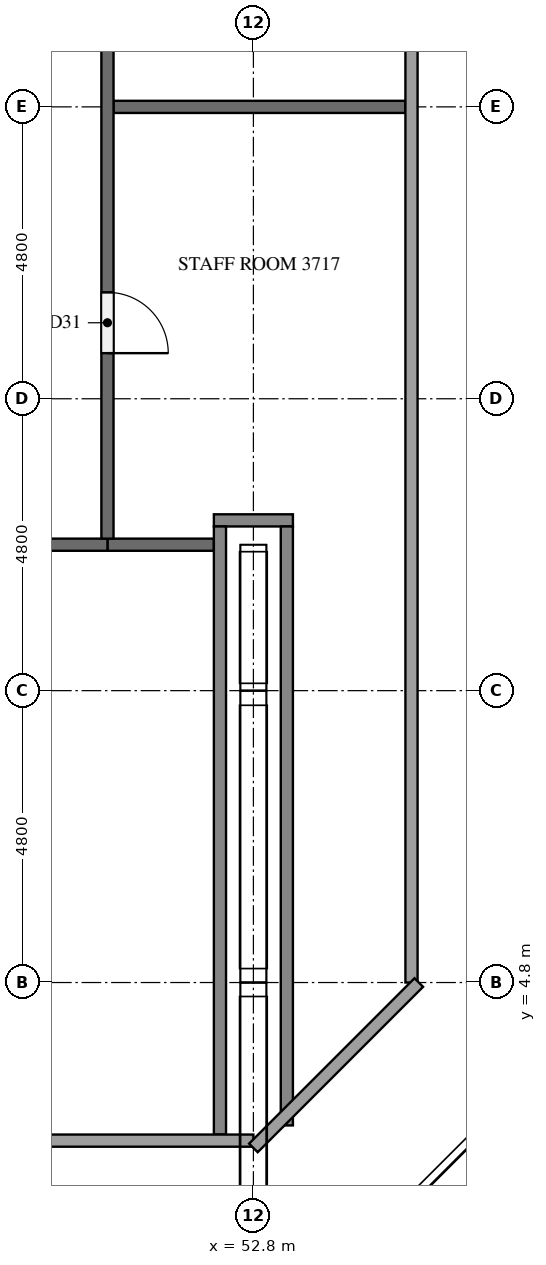
"""IFC4 building model, lengths in metres.
Left out: names, types, materials, properties, quantities, classifications, styles, units other than length and angle.
Written with IfcOpenShell. Run it as: python <this file> out.ifc"""

import sys

from ifc_helpers import new_model, si_unit, direction, frame, frame_2d, origin, place, context, subcontext, project, spatial, rectangle, extrude, element, fill, save


model = new_model("IFC4")
c1 = context("Model", 3, precision=1e-05, world=origin(), true_north=direction((0.0, 1.0)))
c2 = subcontext(c1, "Body", "Model", "MODEL_VIEW")
j1 = project(units=[si_unit("LENGTHUNIT", "METRE"), si_unit("PLANEANGLEUNIT", "RADIAN")], contexts=[c1])
p1 = place(None, origin())
s1 = spatial("IfcSite", under=j1, at=p1, CompositionType="ELEMENT")
p2 = place(p1, origin())
s2 = spatial("IfcBuilding", under=s1, at=p2, CompositionType="ELEMENT")
p3 = place(p2, frame((0.0, 0.0, 143.6)))
s3 = spatial("IfcBuildingStorey", under=s2, at=p3, CompositionType="ELEMENT", Elevation=143.6)
p4 = place(p3, frame((50.4, 12.0, 0.0), z_axis=(0.0, 0.0, 1.0), x_axis=(1.0, 0.0, 0.0)))
e1 = element("IfcWall", 1, at=p4, inside=s3, PredefinedType="PARTITIONING", context=c2, shape_type="SweptSolid", body=[
    extrude(rectangle(XDim=1.75, YDim=0.2, at=frame_2d((0.875, 0.0))), origin(), (0.0, 0.0, 1.0), 5.1),
])
p5 = place(p3, frame((50.4, 12.0, 0.0), z_axis=(0.0, 0.0, 1.0), x_axis=(-1.0, 0.0, 0.0)))
e2 = element("IfcWall", 2, at=p5, inside=s3, PredefinedType="PARTITIONING", context=c2, shape_type="SweptSolid", body=[
    extrude(rectangle(XDim=6.75, YDim=0.2, at=frame_2d((3.375, 0.0))), origin(), (0.0, 0.0, 1.0), 5.1),
])
p6 = place(p5, frame((2.85, 0.0, 0.0)))
e3 = element("IfcOpeningElement", 3, at=p6, cuts=e2, PredefinedType="OPENING", context=c2, shape_type="SweptSolid", body=[
    extrude(rectangle(XDim=1.0, YDim=2.1, at=frame_2d((0.5, 1.05))), frame((0.0, 0.11, 0.0), z_axis=(0.0, -1.0, 0.0), x_axis=(1.0, 0.0, 0.0)), (0.0, 0.0, 1.0), 0.22),
])
p7 = place(p3, frame((52.15, 12.4, 0.0), z_axis=(0.0, 0.0, 1.0), x_axis=(1.0, 0.0, 0.0)))
e4 = element("IfcWall", 4, at=p7, inside=s3, PredefinedType="PARTITIONING", context=c2, shape_type="SweptSolid", body=[
    extrude(rectangle(XDim=1.3, YDim=0.2, at=frame_2d((0.65, 0.0))), origin(), (0.0, 0.0, 1.0), 5.1),
])
p8 = place(p3, frame((50.5, 19.2, 0.0), z_axis=(0.0, 0.0, 1.0), x_axis=(1.0, 0.0, 0.0)))
e5 = element("IfcWall", 5, at=p8, inside=s3, PredefinedType="PARTITIONING", context=c2, shape_type="SweptSolid", body=[
    extrude(rectangle(XDim=4.8, YDim=0.2, at=frame_2d((2.4, 0.0))), origin(), (0.0, 0.0, 1.0), 5.1),
])
p9 = place(p3, frame((50.4, 40.7, 0.0), z_axis=(0.0, 0.0, 1.0), x_axis=(0.0, -1.0, 0.0)))
e6 = element("IfcWall", 6, at=p9, inside=s3, PredefinedType="PARTITIONING", context=c2, shape_type="SweptSolid", body=[
    extrude(rectangle(XDim=28.6, YDim=0.2, at=frame_2d((14.3, 0.0))), origin(), (0.0, 0.0, 1.0), 5.1),
])
p10 = place(p9, frame((24.55, 0.0, 0.0)))
e7 = element("IfcOpeningElement", 7, at=p10, cuts=e6, PredefinedType="OPENING", context=c2, shape_type="SweptSolid", body=[
    extrude(rectangle(XDim=1.0, YDim=2.1, at=frame_2d((0.5, 1.05))), frame((0.0, 0.11, 0.0), z_axis=(0.0, -1.0, 0.0), x_axis=(1.0, 0.0, 0.0)), (0.0, 0.0, 1.0), 0.22),
])
p11 = place(p9, frame((18.65, 0.0, 0.0)))
e8 = element("IfcOpeningElement", 8, at=p11, cuts=e6, PredefinedType="OPENING", context=c2, shape_type="SweptSolid", body=[
    extrude(rectangle(XDim=1.0, YDim=2.1, at=frame_2d((0.5, 1.05))), frame((0.0, 0.11, 0.0), z_axis=(0.0, -1.0, 0.0), x_axis=(1.0, 0.0, 0.0)), (0.0, 0.0, 1.0), 0.22),
])
p12 = place(p9, frame((13.85, 0.0, 0.0)))
e9 = element("IfcOpeningElement", 9, at=p12, cuts=e6, PredefinedType="OPENING", context=c2, shape_type="SweptSolid", body=[
    extrude(rectangle(XDim=1.0, YDim=2.1, at=frame_2d((0.5, 1.05))), frame((0.0, 0.11, 0.0), z_axis=(0.0, -1.0, 0.0), x_axis=(1.0, 0.0, 0.0)), (0.0, 0.0, 1.0), 0.22),
])
p13 = place(p9, frame((9.05, 0.0, 0.0)))
e10 = element("IfcOpeningElement", 10, at=p13, cuts=e6, PredefinedType="OPENING", context=c2, shape_type="SweptSolid", body=[
    extrude(rectangle(XDim=1.0, YDim=2.1, at=frame_2d((0.5, 1.05))), frame((0.0, 0.11, 0.0), z_axis=(0.0, -1.0, 0.0), x_axis=(1.0, 0.0, 0.0)), (0.0, 0.0, 1.0), 0.22),
])
p14 = place(p9, frame((3.05, 0.0, 0.0)))
e11 = element("IfcOpeningElement", 11, at=p14, cuts=e6, PredefinedType="OPENING", context=c2, shape_type="SweptSolid", body=[
    extrude(rectangle(XDim=1.0, YDim=2.1, at=frame_2d((0.5, 1.05))), frame((0.0, 0.11, 0.0), z_axis=(0.0, -1.0, 0.0), x_axis=(1.0, 0.0, 0.0)), (0.0, 0.0, 1.0), 0.22),
])
p15 = place(p3, frame((52.25, 2.3, 0.0), z_axis=(0.0, 0.0, 1.0), x_axis=(0.0, 1.0, 0.0)))
e12 = element("IfcWall", 12, at=p15, inside=s3, PredefinedType="PARTITIONING", context=c2, shape_type="SweptSolid", body=[
    extrude(rectangle(XDim=10.0, YDim=0.2, at=frame_2d((5.0, 0.0))), origin(), (0.0, 0.0, 1.0), 5.1),
])
p16 = place(p3, frame((53.35, 2.45, 0.0), z_axis=(0.0, 0.0, 1.0), x_axis=(0.0, 1.0, 0.0)))
e13 = element("IfcWall", 13, at=p16, inside=s3, PredefinedType="PARTITIONING", context=c2, shape_type="SweptSolid", body=[
    extrude(rectangle(XDim=9.85, YDim=0.2, at=frame_2d((4.925, 0.0))), origin(), (0.0, 0.0, 1.0), 5.1),
])
p17 = place(p10, origin())
e14 = element("IfcDoor", 14, at=p17, inside=s3, OperationType="SINGLE_SWING_RIGHT", PredefinedType="DOOR", context=c2, shape_type="SweptSolid", body=[
    extrude(rectangle(XDim=1.0, YDim=2.1, at=frame_2d((0.5, 1.05))), frame((0.0, 0.025, 0.0), z_axis=(0.0, -1.0, 0.0), x_axis=(1.0, 0.0, 0.0)), (0.0, 0.0, 1.0), 0.05),
])
fill(e7, e14)
save(model, sys.argv[1])
